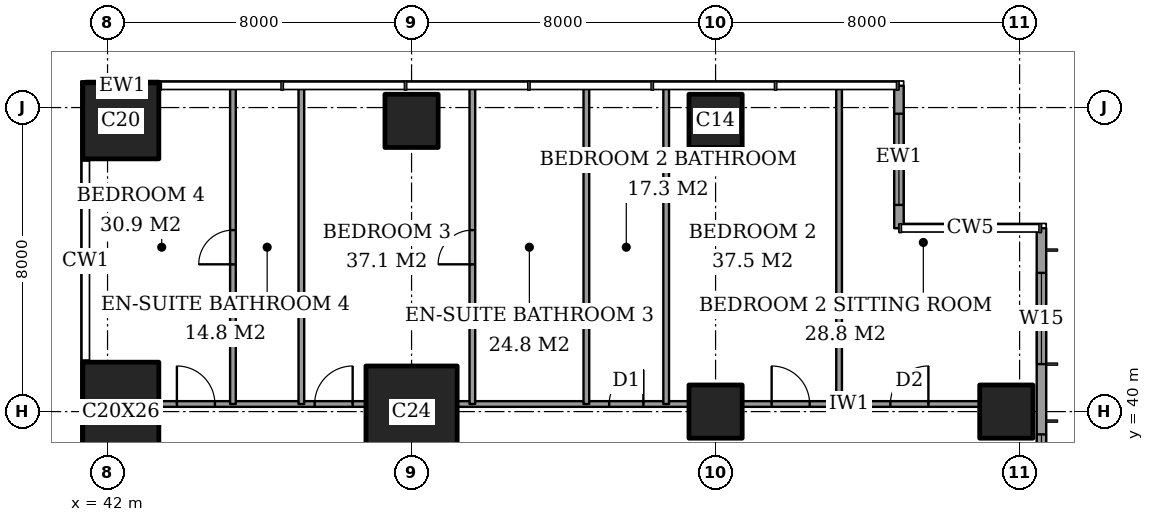
"""IFC4 building model, lengths in metres.
Left out: names, types, materials, properties, quantities, classifications, styles, units other than length and angle.
Written with IfcOpenShell. Run it as: python <this file> out.ifc"""

import sys

from ifc_helpers import new_model, si_unit, direction, frame, frame_2d, origin, origin_2d, place, context, subcontext, project, spatial, rectangle, extrude, element, fill, save


model = new_model("IFC4")
c1 = context("Model", 3, precision=1e-05, world=origin(), true_north=direction((0.0, 1.0)))
c2 = subcontext(c1, "Body", "Model", "MODEL_VIEW")
j1 = project(units=[si_unit("LENGTHUNIT", "METRE"), si_unit("PLANEANGLEUNIT", "RADIAN")], contexts=[c1])
p1 = place(None, origin())
s1 = spatial("IfcSite", under=j1, at=p1, CompositionType="ELEMENT")
p2 = place(p1, origin())
s2 = spatial("IfcBuilding", under=s1, at=p2, CompositionType="ELEMENT")
p3 = place(p2, frame((0.0, 0.0, 287.1)))
s3 = spatial("IfcBuildingStorey", under=s2, at=p3, CompositionType="ELEMENT", Elevation=287.1)
p4 = place(p3, frame((42.35, 40.0, 0.0), z_axis=(0.0, 0.0, 1.0), x_axis=(1.0, 0.0, 0.0)))
e1 = element("IfcColumn", 1, at=p4, inside=s3, PredefinedType="COLUMN", context=c2, shape_type="SweptSolid", body=[
    extrude(rectangle(XDim=2.0, YDim=2.6, at=origin_2d()), origin(), (0.0, 0.0, 1.0), 4.5),
])
p5 = place(p3, frame((42.35, 47.65, 0.0), z_axis=(0.0, 0.0, 1.0), x_axis=(1.0, 0.0, 0.0)))
e2 = element("IfcColumn", 2, at=p5, inside=s3, PredefinedType="COLUMN", context=c2, shape_type="SweptSolid", body=[
    extrude(rectangle(XDim=2.0, YDim=2.0, at=origin_2d()), origin(), (0.0, 0.0, 1.0), 4.5),
])
p6 = place(p3, frame((50.0, 40.0, 0.0), z_axis=(0.0, 0.0, 1.0), x_axis=(1.0, 0.0, 0.0)))
e3 = element("IfcColumn", 3, at=p6, inside=s3, PredefinedType="COLUMN", context=c2, shape_type="SweptSolid", body=[
    extrude(rectangle(XDim=2.4, YDim=2.4, at=origin_2d()), origin(), (0.0, 0.0, 1.0), 4.5),
])
for number, where, z_axis, x_axis in (
    (4, (50.0, 47.65, 0.0), (0.0, 0.0, 1.0), (1.0, 0.0, 0.0)),
    (5, (58.0, 40.0, 0.0), (0.0, 0.0, 1.0), (1.0, 0.0, 0.0)),
    (6, (58.0, 47.65, 0.0), (0.0, 0.0, 1.0), (1.0, 0.0, 0.0)),
    (7, (65.65, 40.0, 0.0), (0.0, 0.0, 1.0), (1.0, 0.0, 0.0)),
):
    element("IfcColumn", number, at=place(p3, frame(where, z_axis=z_axis, x_axis=x_axis)), inside=s3, PredefinedType="COLUMN", context=c2, shape_type="SweptSolid", body=[
        extrude(rectangle(XDim=1.4, YDim=1.4, at=origin_2d()), origin(), (0.0, 0.0, 1.0), 4.5),
    ])
p7 = place(p3, frame((66.575, 3.175, 0.0), z_axis=(0.0, 0.0, 1.0), x_axis=(0.0, 1.0, 0.0)))
e8 = element("IfcWall", 8, at=p7, inside=s3, PredefinedType="SOLIDWALL", context=c2, shape_type="SweptSolid", body=[
    extrude(rectangle(XDim=41.65, YDim=0.25, at=frame_2d((20.825, 0.0))), origin(), (0.0, 0.0, 1.0), 4.5),
])
p8 = place(p7, frame((1.275, 0.0, 0.6)))
e9 = element("IfcOpeningElement", 9, at=p8, cuts=e8, PredefinedType="OPENING", context=c2, shape_type="SweptSolid", body=[
    extrude(rectangle(XDim=2.4, YDim=2.8, at=frame_2d((1.2, 1.4))), frame((0.0, 0.135, 0.0), z_axis=(0.0, -1.0, 0.0), x_axis=(1.0, 0.0, 0.0)), (0.0, 0.0, 1.0), 0.27),
])
p9 = place(p7, frame((5.525, 0.0, 0.6)))
e10 = element("IfcOpeningElement", 10, at=p9, cuts=e8, PredefinedType="OPENING", context=c2, shape_type="SweptSolid", body=[
    extrude(rectangle(XDim=1.2, YDim=2.8, at=frame_2d((0.6, 1.4))), frame((0.0, 0.135, 0.0), z_axis=(0.0, -1.0, 0.0), x_axis=(1.0, 0.0, 0.0)), (0.0, 0.0, 1.0), 0.27),
])
p10 = place(p7, frame((9.425, 0.0, 0.6)))
e11 = element("IfcOpeningElement", 11, at=p10, cuts=e8, PredefinedType="OPENING", context=c2, shape_type="SweptSolid", body=[
    extrude(rectangle(XDim=2.4, YDim=2.8, at=frame_2d((1.2, 1.4))), frame((0.0, 0.135, 0.0), z_axis=(0.0, -1.0, 0.0), x_axis=(1.0, 0.0, 0.0)), (0.0, 0.0, 1.0), 0.27),
])
p11 = place(p7, frame((14.525, 0.0, 0.6)))
e12 = element("IfcOpeningElement", 12, at=p11, cuts=e8, PredefinedType="OPENING", context=c2, shape_type="SweptSolid", body=[
    extrude(rectangle(XDim=2.4, YDim=2.8, at=frame_2d((1.2, 1.4))), frame((0.0, 0.135, 0.0), z_axis=(0.0, -1.0, 0.0), x_axis=(1.0, 0.0, 0.0)), (0.0, 0.0, 1.0), 0.27),
])
p12 = place(p7, frame((17.725, 0.0, 0.6)))
e13 = element("IfcOpeningElement", 13, at=p12, cuts=e8, PredefinedType="OPENING", context=c2, shape_type="SweptSolid", body=[
    extrude(rectangle(XDim=2.4, YDim=2.8, at=frame_2d((1.2, 1.4))), frame((0.0, 0.135, 0.0), z_axis=(0.0, -1.0, 0.0), x_axis=(1.0, 0.0, 0.0)), (0.0, 0.0, 1.0), 0.27),
])
p13 = place(p7, frame((21.525, 0.0, 0.6)))
e14 = element("IfcOpeningElement", 14, at=p13, cuts=e8, PredefinedType="OPENING", context=c2, shape_type="SweptSolid", body=[
    extrude(rectangle(XDim=2.4, YDim=2.8, at=frame_2d((1.2, 1.4))), frame((0.0, 0.135, 0.0), z_axis=(0.0, -1.0, 0.0), x_axis=(1.0, 0.0, 0.0)), (0.0, 0.0, 1.0), 0.27),
])
p14 = place(p7, frame((24.725, 0.0, 0.6)))
e15 = element("IfcOpeningElement", 15, at=p14, cuts=e8, PredefinedType="OPENING", context=c2, shape_type="SweptSolid", body=[
    extrude(rectangle(XDim=2.4, YDim=2.8, at=frame_2d((1.2, 1.4))), frame((0.0, 0.135, 0.0), z_axis=(0.0, -1.0, 0.0), x_axis=(1.0, 0.0, 0.0)), (0.0, 0.0, 1.0), 0.27),
])
p15 = place(p7, frame((29.825, 0.0, 0.6)))
e16 = element("IfcOpeningElement", 16, at=p15, cuts=e8, PredefinedType="OPENING", context=c2, shape_type="SweptSolid", body=[
    extrude(rectangle(XDim=2.4, YDim=2.8, at=frame_2d((1.2, 1.4))), frame((0.0, 0.135, 0.0), z_axis=(0.0, -1.0, 0.0), x_axis=(1.0, 0.0, 0.0)), (0.0, 0.0, 1.0), 0.27),
])
p16 = place(p7, frame((35.025, 0.0, 0.6)))
e17 = element("IfcOpeningElement", 17, at=p16, cuts=e8, PredefinedType="OPENING", context=c2, shape_type="SweptSolid", body=[
    extrude(rectangle(XDim=1.2, YDim=2.8, at=frame_2d((0.6, 1.4))), frame((0.0, 0.135, 0.0), z_axis=(0.0, -1.0, 0.0), x_axis=(1.0, 0.0, 0.0)), (0.0, 0.0, 1.0), 0.27),
])
p17 = place(p7, frame((38.075, 0.0, 0.6)))
e18 = element("IfcOpeningElement", 18, at=p17, cuts=e8, PredefinedType="OPENING", context=c2, shape_type="SweptSolid", body=[
    extrude(rectangle(XDim=2.4, YDim=2.8, at=frame_2d((1.2, 1.4))), frame((0.0, 0.135, 0.0), z_axis=(0.0, -1.0, 0.0), x_axis=(1.0, 0.0, 0.0)), (0.0, 0.0, 1.0), 0.27),
])
p18 = place(p3, frame((62.825, 44.825, 0.0), z_axis=(0.0, 0.0, 1.0), x_axis=(0.0, 1.0, 0.0)))
e19 = element("IfcWall", 19, at=p18, inside=s3, PredefinedType="SOLIDWALL", context=c2, shape_type="SweptSolid", body=[
    extrude(rectangle(XDim=3.75, YDim=0.25, at=frame_2d((1.875, 0.0))), origin(), (0.0, 0.0, 1.0), 4.5),
])
p19 = place(p18, frame((0.613, 0.0, 0.6)))
e20 = element("IfcOpeningElement", 20, at=p19, cuts=e19, PredefinedType="OPENING", context=c2, shape_type="SweptSolid", body=[
    extrude(rectangle(XDim=2.4, YDim=2.8, at=frame_2d((1.2, 1.4))), frame((0.0, 0.135, 0.0), z_axis=(0.0, -1.0, 0.0), x_axis=(1.0, 0.0, 0.0)), (0.0, 0.0, 1.0), 0.27),
])
p20 = place(p3, frame((43.35, 48.575, 0.0), z_axis=(0.0, 0.0, 1.0), x_axis=(-1.0, 0.0, 0.0)))
e21 = element("IfcWall", 21, at=p20, inside=s3, PredefinedType="SOLIDWALL", context=c2, shape_type="SweptSolid", body=[
    extrude(rectangle(XDim=1.925, YDim=0.25, at=frame_2d((0.962, 0.0))), origin(), (0.0, 0.0, 1.0), 4.5),
])
p21 = place(p3, frame((43.35, 40.2, 0.0), z_axis=(0.0, 0.0, 1.0), x_axis=(1.0, 0.0, 0.0)))
e22 = element("IfcWall", 22, at=p21, inside=s3, PredefinedType="PARTITIONING", context=c2, shape_type="SweptSolid", body=[
    extrude(rectangle(XDim=5.45, YDim=0.15, at=frame_2d((2.725, 0.0))), origin(), (0.0, 0.0, 1.0), 4.2),
])
p22 = place(p21, frame((4.1, 0.0, 0.0)))
e23 = element("IfcOpeningElement", 23, at=p22, cuts=e22, PredefinedType="OPENING", context=c2, shape_type="SweptSolid", body=[
    extrude(rectangle(XDim=1.0, YDim=2.1, at=frame_2d((0.5, 1.05))), frame((0.0, 0.085, 0.0), z_axis=(0.0, -1.0, 0.0), x_axis=(1.0, 0.0, 0.0)), (0.0, 0.0, 1.0), 0.17),
])
p23 = place(p21, frame((0.475, 0.0, 0.0)))
e24 = element("IfcOpeningElement", 24, at=p23, cuts=e22, PredefinedType="OPENING", context=c2, shape_type="SweptSolid", body=[
    extrude(rectangle(XDim=1.0, YDim=2.1, at=frame_2d((0.5, 1.05))), frame((0.0, 0.085, 0.0), z_axis=(0.0, -1.0, 0.0), x_axis=(1.0, 0.0, 0.0)), (0.0, 0.0, 1.0), 0.17),
])
p24 = place(p3, frame((51.2, 40.2, 0.0), z_axis=(0.0, 0.0, 1.0), x_axis=(1.0, 0.0, 0.0)))
e25 = element("IfcWall", 25, at=p24, inside=s3, PredefinedType="PARTITIONING", context=c2, shape_type="SweptSolid", body=[
    extrude(rectangle(XDim=6.1, YDim=0.15, at=frame_2d((3.05, 0.0))), origin(), (0.0, 0.0, 1.0), 4.2),
])
p25 = place(p24, frame((4.0, 0.0, 0.0)))
e26 = element("IfcOpeningElement", 26, at=p25, cuts=e25, PredefinedType="OPENING", context=c2, shape_type="SweptSolid", body=[
    extrude(rectangle(XDim=0.9, YDim=2.1, at=frame_2d((0.45, 1.05))), frame((0.0, 0.085, 0.0), z_axis=(0.0, -1.0, 0.0), x_axis=(1.0, 0.0, 0.0)), (0.0, 0.0, 1.0), 0.17),
])
p26 = place(p3, frame((58.7, 40.2, 0.0), z_axis=(0.0, 0.0, 1.0), x_axis=(1.0, 0.0, 0.0)))
e27 = element("IfcWall", 27, at=p26, inside=s3, PredefinedType="PARTITIONING", context=c2, shape_type="SweptSolid", body=[
    extrude(rectangle(XDim=6.25, YDim=0.15, at=frame_2d((3.125, 0.0))), origin(), (0.0, 0.0, 1.0), 4.2),
])
p27 = place(p26, frame((3.9, 0.0, 0.0)))
e28 = element("IfcOpeningElement", 28, at=p27, cuts=e27, PredefinedType="OPENING", context=c2, shape_type="SweptSolid", body=[
    extrude(rectangle(XDim=1.0, YDim=2.1, at=frame_2d((0.5, 1.05))), frame((0.0, 0.085, 0.0), z_axis=(0.0, -1.0, 0.0), x_axis=(1.0, 0.0, 0.0)), (0.0, 0.0, 1.0), 0.17),
])
p28 = place(p26, frame((0.775, 0.0, 0.0)))
e29 = element("IfcOpeningElement", 29, at=p28, cuts=e27, PredefinedType="OPENING", context=c2, shape_type="SweptSolid", body=[
    extrude(rectangle(XDim=1.0, YDim=2.1, at=frame_2d((0.5, 1.05))), frame((0.0, 0.085, 0.0), z_axis=(0.0, -1.0, 0.0), x_axis=(1.0, 0.0, 0.0)), (0.0, 0.0, 1.0), 0.17),
])
p29 = place(p3, frame((45.3, 40.2, 0.0), z_axis=(0.0, 0.0, 1.0), x_axis=(0.0, 1.0, 0.0)))
e30 = element("IfcWall", 30, at=p29, inside=s3, PredefinedType="PARTITIONING", context=c2, shape_type="SweptSolid", body=[
    extrude(rectangle(XDim=8.361, YDim=0.15, at=frame_2d((4.181, 0.0))), origin(), (0.0, 0.0, 1.0), 4.2),
])
p30 = place(p29, frame((3.675, 0.0, 0.0)))
e31 = element("IfcOpeningElement", 31, at=p30, cuts=e30, PredefinedType="OPENING", context=c2, shape_type="SweptSolid", body=[
    extrude(rectangle(XDim=0.9, YDim=2.1, at=frame_2d((0.45, 1.05))), frame((0.0, 0.085, 0.0), z_axis=(0.0, -1.0, 0.0), x_axis=(1.0, 0.0, 0.0)), (0.0, 0.0, 1.0), 0.17),
])
p31 = place(p3, frame((47.1, 40.2, 0.0), z_axis=(0.0, 0.0, 1.0), x_axis=(0.0, 1.0, 0.0)))
e32 = element("IfcWall", 32, at=p31, inside=s3, PredefinedType="PARTITIONING", context=c2, shape_type="SweptSolid", body=[
    extrude(rectangle(XDim=8.361, YDim=0.15, at=frame_2d((4.181, 0.0))), origin(), (0.0, 0.0, 1.0), 4.2),
])
p32 = place(p3, frame((51.6, 40.2, 0.0), z_axis=(0.0, 0.0, 1.0), x_axis=(0.0, 1.0, 0.0)))
e33 = element("IfcWall", 33, at=p32, inside=s3, PredefinedType="PARTITIONING", context=c2, shape_type="SweptSolid", body=[
    extrude(rectangle(XDim=8.361, YDim=0.15, at=frame_2d((4.181, 0.0))), origin(), (0.0, 0.0, 1.0), 4.2),
])
p33 = place(p32, frame((3.675, 0.0, 0.0)))
e34 = element("IfcOpeningElement", 34, at=p33, cuts=e33, PredefinedType="OPENING", context=c2, shape_type="SweptSolid", body=[
    extrude(rectangle(XDim=0.9, YDim=2.1, at=frame_2d((0.45, 1.05))), frame((0.0, 0.085, 0.0), z_axis=(0.0, -1.0, 0.0), x_axis=(1.0, 0.0, 0.0)), (0.0, 0.0, 1.0), 0.17),
])
for number, where, z_axis, x_axis in (
    (35, (54.6, 40.2, 0.0), (0.0, 0.0, 1.0), (0.0, 1.0, 0.0)),
    (36, (56.7, 40.2, 0.0), (0.0, 0.0, 1.0), (0.0, 1.0, 0.0)),
    (37, (61.25, 40.2, 0.0), (0.0, 0.0, 1.0), (0.0, 1.0, 0.0)),
):
    element("IfcWall", number, at=place(p3, frame(where, z_axis=z_axis, x_axis=x_axis)), inside=s3, PredefinedType="PARTITIONING", context=c2, shape_type="SweptSolid", body=[
        extrude(rectangle(XDim=8.361, YDim=0.15, at=frame_2d((4.181, 0.0))), origin(), (0.0, 0.0, 1.0), 4.2),
    ])
p34 = place(p16, origin())
e38 = element("IfcWindow", 38, at=p34, inside=s3, PartitioningType="SINGLE_PANEL", PredefinedType="WINDOW", context=c2, shape_type="SweptSolid", body=[
    extrude(rectangle(XDim=1.2, YDim=2.8, at=frame_2d((0.6, 1.4))), frame((0.0, 0.03, 0.0), z_axis=(0.0, -1.0, 0.0), x_axis=(1.0, 0.0, 0.0)), (0.0, 0.0, 1.0), 0.06),
])
fill(e17, e38)
p35 = place(p17, origin())
e39 = element("IfcWindow", 39, at=p35, inside=s3, PartitioningType="SINGLE_PANEL", PredefinedType="WINDOW", context=c2, shape_type="SweptSolid", body=[
    extrude(rectangle(XDim=2.4, YDim=2.8, at=frame_2d((1.2, 1.4))), frame((0.0, 0.03, 0.0), z_axis=(0.0, -1.0, 0.0), x_axis=(1.0, 0.0, 0.0)), (0.0, 0.0, 1.0), 0.06),
])
fill(e18, e39)
p36 = place(p19, origin())
e40 = element("IfcWindow", 40, at=p36, inside=s3, PartitioningType="SINGLE_PANEL", PredefinedType="WINDOW", context=c2, shape_type="SweptSolid", body=[
    extrude(rectangle(XDim=2.4, YDim=2.8, at=frame_2d((1.2, 1.4))), frame((0.0, 0.03, 0.0), z_axis=(0.0, -1.0, 0.0), x_axis=(1.0, 0.0, 0.0)), (0.0, 0.0, 1.0), 0.06),
])
fill(e20, e40)
p37 = place(p27, origin())
e41 = element("IfcDoor", 41, at=p37, inside=s3, OperationType="SINGLE_SWING_LEFT", PredefinedType="DOOR", context=c2, shape_type="SweptSolid", body=[
    extrude(rectangle(XDim=1.0, YDim=2.1, at=frame_2d((0.5, 1.05))), frame((0.0, 0.025, 0.0), z_axis=(0.0, -1.0, 0.0), x_axis=(1.0, 0.0, 0.0)), (0.0, 0.0, 1.0), 0.05),
])
fill(e28, e41)
p38 = place(p28, origin())
e42 = element("IfcDoor", 42, at=p38, inside=s3, OperationType="SINGLE_SWING_RIGHT", PredefinedType="DOOR", context=c2, shape_type="SweptSolid", body=[
    extrude(rectangle(XDim=1.0, YDim=2.1, at=frame_2d((0.5, 1.05))), frame((0.0, 0.025, 0.0), z_axis=(0.0, -1.0, 0.0), x_axis=(1.0, 0.0, 0.0)), (0.0, 0.0, 1.0), 0.05),
])
fill(e29, e42)
p39 = place(p25, origin())
e43 = element("IfcDoor", 43, at=p39, inside=s3, OperationType="SINGLE_SWING_LEFT", PredefinedType="DOOR", context=c2, shape_type="SweptSolid", body=[
    extrude(rectangle(XDim=0.9, YDim=2.1, at=frame_2d((0.45, 1.05))), frame((0.0, 0.025, 0.0), z_axis=(0.0, -1.0, 0.0), x_axis=(1.0, 0.0, 0.0)), (0.0, 0.0, 1.0), 0.05),
])
fill(e26, e43)
p40 = place(p33, origin())
e44 = element("IfcDoor", 44, at=p40, inside=s3, OperationType="SINGLE_SWING_RIGHT", PredefinedType="DOOR", context=c2, shape_type="SweptSolid", body=[
    extrude(rectangle(XDim=0.9, YDim=2.1, at=frame_2d((0.45, 1.05))), frame((0.0, 0.025, 0.0), z_axis=(0.0, -1.0, 0.0), x_axis=(1.0, 0.0, 0.0)), (0.0, 0.0, 1.0), 0.05),
])
fill(e34, e44)
p41 = place(p22, origin())
e45 = element("IfcDoor", 45, at=p41, inside=s3, OperationType="SINGLE_SWING_LEFT", PredefinedType="DOOR", context=c2, shape_type="SweptSolid", body=[
    extrude(rectangle(XDim=1.0, YDim=2.1, at=frame_2d((0.5, 1.05))), frame((0.0, 0.025, 0.0), z_axis=(0.0, -1.0, 0.0), x_axis=(1.0, 0.0, 0.0)), (0.0, 0.0, 1.0), 0.05),
])
fill(e23, e45)
p42 = place(p30, origin())
e46 = element("IfcDoor", 46, at=p42, inside=s3, OperationType="SINGLE_SWING_RIGHT", PredefinedType="DOOR", context=c2, shape_type="SweptSolid", body=[
    extrude(rectangle(XDim=0.9, YDim=2.1, at=frame_2d((0.45, 1.05))), frame((0.0, 0.025, 0.0), z_axis=(0.0, -1.0, 0.0), x_axis=(1.0, 0.0, 0.0)), (0.0, 0.0, 1.0), 0.05),
])
fill(e31, e46)
p43 = place(p23, origin())
e47 = element("IfcDoor", 47, at=p43, inside=s3, OperationType="SINGLE_SWING_RIGHT", PredefinedType="DOOR", context=c2, shape_type="SweptSolid", body=[
    extrude(rectangle(XDim=1.0, YDim=2.1, at=frame_2d((0.5, 1.05))), frame((0.0, 0.025, 0.0), z_axis=(0.0, -1.0, 0.0), x_axis=(1.0, 0.0, 0.0)), (0.0, 0.0, 1.0), 0.05),
])
fill(e24, e47)
save(model, sys.argv[1])
